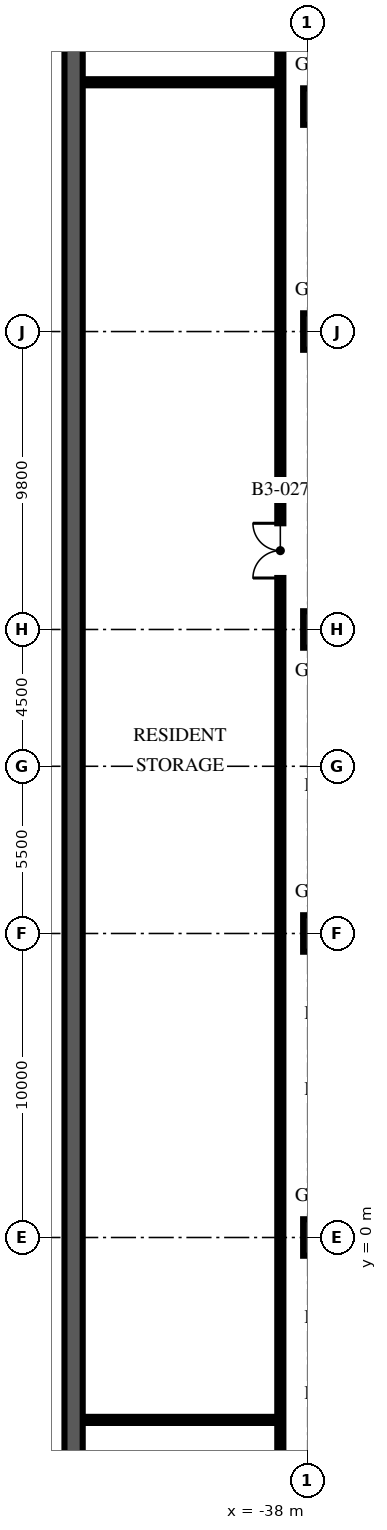
"""IFC4 building model, lengths in metres.
Left out: names, types, materials, properties, quantities, classifications, styles, units other than length and angle.
Written with IfcOpenShell. Run it as: python <this file> out.ifc"""

import sys

from ifc_helpers import new_model, si_unit, direction, frame, frame_2d, origin, origin_2d, place, context, subcontext, project, spatial, rectangle, extrude, element, fill, save


model = new_model("IFC4")
c1 = context("Model", 3, precision=1e-05, world=origin(), true_north=direction((0.0, 1.0)))
c2 = subcontext(c1, "Body", "Model", "MODEL_VIEW")
j1 = project(units=[si_unit("LENGTHUNIT", "METRE"), si_unit("PLANEANGLEUNIT", "RADIAN")], contexts=[c1])
p1 = place(None, origin())
s1 = spatial("IfcSite", under=j1, at=p1, CompositionType="ELEMENT")
p2 = place(p1, origin())
s2 = spatial("IfcBuilding", under=s1, at=p2, CompositionType="ELEMENT")
p3 = place(p2, frame((0.0, 0.0, -13.2)))
s3 = spatial("IfcBuildingStorey", under=s2, at=p3, CompositionType="ELEMENT", Elevation=-13.2)
p4 = place(p3, frame((-45.7, -49.4, -0.4), z_axis=(0.0, 0.0, 1.0), x_axis=(0.0, 1.0, 0.0)))
e1 = element("IfcWall", 1, at=p4, inside=s3, PredefinedType="SOLIDWALL", context=c2, shape_type="SweptSolid", body=[
    extrude(rectangle(XDim=98.8, YDim=0.6, at=frame_2d((49.4, 0.0))), origin(), (0.0, 0.0, 1.0), 4.3),
])
for number, where, z_axis, x_axis in (
    (2, (-37.55, 0.0, -0.4), (0.0, 0.0, 1.0), (1.0, 0.0, 0.0)),
    (3, (-37.55, 10.0, -0.4), (0.0, 0.0, 1.0), (1.0, 0.0, 0.0)),
    (4, (-37.55, 20.0, -0.4), (0.0, 0.0, 1.0), (1.0, 0.0, 0.0)),
    (5, (-37.55, 29.8, -0.4), (0.0, 0.0, 1.0), (1.0, 0.0, 0.0)),
    (6, (-37.55, 37.2, -0.4), (0.0, 0.0, 1.0), (1.0, 0.0, 0.0)),
):
    element("IfcColumn", number, at=place(p3, frame(where, z_axis=z_axis, x_axis=x_axis)), inside=s3, PredefinedType="COLUMN", context=c2, shape_type="SweptSolid", body=[
        extrude(rectangle(XDim=1.2, YDim=1.2, at=origin_2d()), origin(), (0.0, 0.0, 1.0), 4.6),
    ])
p5 = place(p3, frame((-38.9, -49.38, 0.0), z_axis=(0.0, 0.0, 1.0), x_axis=(0.0, 1.0, 0.0)))
e7 = element("IfcWall", 7, at=p5, inside=s3, PredefinedType="SOLIDWALL", context=c2, shape_type="SweptSolid", body=[
    extrude(rectangle(XDim=98.76, YDim=0.2, at=frame_2d((49.38, 0.0))), origin(), (0.0, 0.0, 1.0), 2.9),
])
p6 = place(p5, frame((4.77, 0.0, 0.0)))
e8 = element("IfcOpeningElement", 8, at=p6, cuts=e7, PredefinedType="OPENING", context=c2, shape_type="SweptSolid", body=[
    extrude(rectangle(XDim=1.8, YDim=2.4, at=frame_2d((0.9, 1.2))), frame((0.0, 0.11, 0.0), z_axis=(0.0, -1.0, 0.0), x_axis=(1.0, 0.0, 0.0)), (0.0, 0.0, 1.0), 0.22),
])
p7 = place(p5, frame((26.47, 0.0, 0.0)))
e9 = element("IfcOpeningElement", 9, at=p7, cuts=e7, PredefinedType="OPENING", context=c2, shape_type="SweptSolid", body=[
    extrude(rectangle(XDim=1.8, YDim=2.4, at=frame_2d((0.9, 1.2))), frame((0.0, 0.11, 0.0), z_axis=(0.0, -1.0, 0.0), x_axis=(1.0, 0.0, 0.0)), (0.0, 0.0, 1.0), 0.22),
])
p8 = place(p5, frame((71.073, 0.0, 0.0)))
e10 = element("IfcOpeningElement", 10, at=p8, cuts=e7, PredefinedType="OPENING", context=c2, shape_type="SweptSolid", body=[
    extrude(rectangle(XDim=1.8, YDim=2.4, at=frame_2d((0.9, 1.2))), frame((0.0, 0.11, 0.0), z_axis=(0.0, -1.0, 0.0), x_axis=(1.0, 0.0, 0.0)), (0.0, 0.0, 1.0), 0.22),
])
p9 = place(p5, frame((93.903, 0.0, 0.0)))
e11 = element("IfcOpeningElement", 11, at=p9, cuts=e7, PredefinedType="OPENING", context=c2, shape_type="SweptSolid", body=[
    extrude(rectangle(XDim=1.8, YDim=2.4, at=frame_2d((0.9, 1.2))), frame((0.0, 0.11, 0.0), z_axis=(0.0, -1.0, 0.0), x_axis=(1.0, 0.0, 0.0)), (0.0, 0.0, 1.0), 0.22),
])
for number, where, z_axis, x_axis in (
    (12, (-45.38, -6.0, 0.0), (0.0, 0.0, 1.0), (1.0, 0.0, 0.0)),
    (13, (-45.38, 38.0, 0.0), (0.0, 0.0, 1.0), (1.0, 0.0, 0.0)),
):
    element("IfcWall", number, at=place(p3, frame(where, z_axis=z_axis, x_axis=x_axis)), inside=s3, PredefinedType="SOLIDWALL", context=c2, shape_type="SweptSolid", body=[
        extrude(rectangle(XDim=6.38, YDim=0.2, at=frame_2d((3.19, 0.0))), origin(), (0.0, 0.0, 1.0), 3.9),
    ])
p10 = place(p8, origin())
e14 = element("IfcDoor", 14, at=p10, inside=s3, OperationType="DOUBLE_DOOR_SINGLE_SWING", PredefinedType="DOOR", context=c2, shape_type="SweptSolid", body=[
    extrude(rectangle(XDim=1.8, YDim=2.4, at=frame_2d((0.9, 1.2))), frame((0.0, 0.025, 0.0), z_axis=(0.0, -1.0, 0.0), x_axis=(1.0, 0.0, 0.0)), (0.0, 0.0, 1.0), 0.05),
])
fill(e10, e14)
save(model, sys.argv[1])
